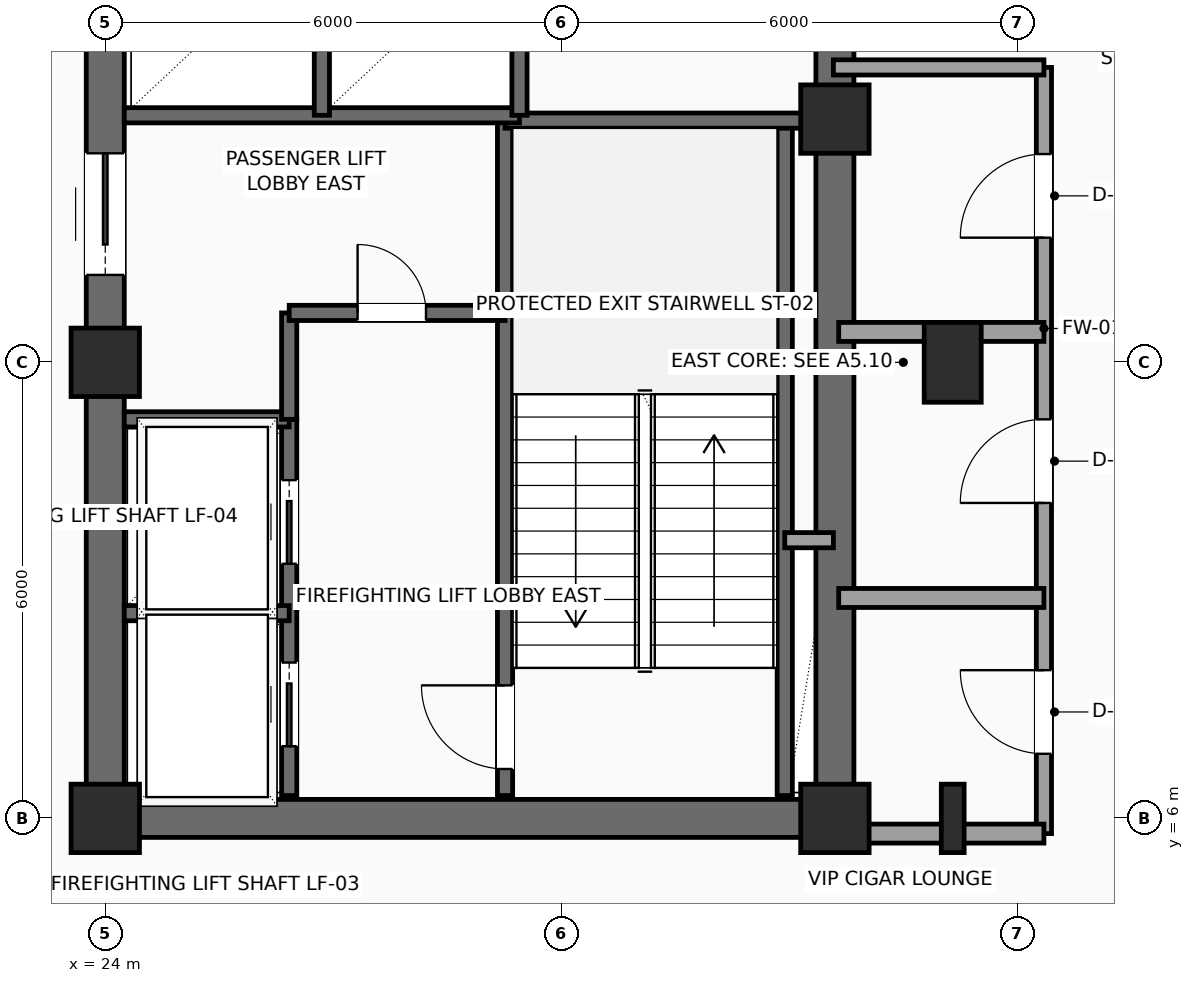
"""IFC4 building model, lengths in metres.
Left out: names, types, materials, properties, quantities, classifications, styles, units other than length and angle.
Written with IfcOpenShell. Run it as: python <this file> out.ifc"""

import sys

from ifc_helpers import new_model, si_unit, direction, frame, frame_2d, origin, origin_2d, place, context, subcontext, project, spatial, rectangle, i_section, extrude, element, fill, save


model = new_model("IFC4")
c1 = context("Model", 3, precision=1e-05, world=origin(), true_north=direction((0.0, 1.0)))
c2 = subcontext(c1, "Body", "Model", "MODEL_VIEW")
j1 = project(units=[si_unit("LENGTHUNIT", "METRE"), si_unit("PLANEANGLEUNIT", "RADIAN")], contexts=[c1])
p1 = place(None, origin())
s1 = spatial("IfcSite", under=j1, at=p1, CompositionType="ELEMENT")
p2 = place(p1, origin())
s2 = spatial("IfcBuilding", under=s1, at=p2, CompositionType="ELEMENT")
p3 = place(p2, frame((0.0, 0.0, 180.45)))
s3 = spatial("IfcBuildingStorey", under=s2, at=p3, CompositionType="ELEMENT", Elevation=180.45)
for number, where, z_axis, x_axis in (
    (1, (24.0, 6.0, 0.0), (0.0, 0.0, 1.0), (1.0, 0.0, 0.0)),
    (2, (24.0, 12.0, 0.0), (0.0, 0.0, 1.0), (1.0, 0.0, 0.0)),
    (3, (33.6, 6.0, 0.0), (0.0, 0.0, 1.0), (1.0, 0.0, 0.0)),
    (4, (33.6, 15.2, 0.0), (0.0, 0.0, 1.0), (1.0, 0.0, 0.0)),
):
    element("IfcColumn", number, at=place(p3, frame(where, z_axis=z_axis, x_axis=x_axis)), inside=s3, PredefinedType="COLUMN", context=c2, shape_type="SweptSolid", body=[
        extrude(rectangle(XDim=0.9, YDim=0.9, at=origin_2d()), origin(), (0.0, 0.0, 1.0), 3.75),
    ])
p4 = place(p3, frame((35.15, 6.0, 0.0), z_axis=(0.0, 0.0, 1.0), x_axis=(1.0, 0.0, 0.0)))
e5 = element("IfcColumn", 5, at=p4, inside=s3, PredefinedType="COLUMN", context=c2, shape_type="SweptSolid", body=[
    extrude(i_section(OverallWidth=0.3, OverallDepth=0.9, WebThickness=0.019, FlangeThickness=0.035, FilletRadius=0.03, at=origin_2d()), origin(), (0.0, 0.0, 1.0), 3.75),
])
p5 = place(p3, frame((35.15, 12.0, 0.0), z_axis=(0.0, 0.0, 1.0), x_axis=(1.0, 0.0, 0.0)))
e6 = element("IfcColumn", 6, at=p5, inside=s3, PredefinedType="COLUMN", context=c2, shape_type="SweptSolid", body=[
    extrude(rectangle(XDim=0.75, YDim=1.05, at=origin_2d()), origin(), (0.0, 0.0, 1.0), 3.75),
])
p6 = place(p3, frame((24.0, 6.0, 0.0), z_axis=(0.0, 0.0, 1.0), x_axis=(1.0, 0.0, 0.0)))
e7 = element("IfcWall", 7, at=p6, inside=s3, PredefinedType="SHEAR", context=c2, shape_type="SweptSolid", body=[
    extrude(rectangle(XDim=9.6, YDim=0.5, at=frame_2d((4.8, 0.0))), origin(), (0.0, 0.0, 1.0), 3.54),
])
p7 = place(p3, frame((24.0, 6.0, 0.0), z_axis=(0.0, 0.0, 1.0), x_axis=(0.0, 1.0, 0.0)))
e8 = element("IfcWall", 8, at=p7, inside=s3, PredefinedType="SHEAR", context=c2, shape_type="SweptSolid", body=[
    extrude(rectangle(XDim=12.0, YDim=0.5, at=frame_2d((6.0, 0.0))), origin(), (0.0, 0.0, 1.0), 3.54),
])
p8 = place(p7, frame((7.15, 0.0, 0.0)))
e9 = element("IfcOpeningElement", 9, at=p8, cuts=e8, PredefinedType="OPENING", context=c2, shape_type="SweptSolid", body=[
    extrude(rectangle(XDim=1.6, YDim=2.3, at=frame_2d((0.8, 1.15))), frame((0.0, 0.26, 0.0), z_axis=(0.0, -1.0, 0.0), x_axis=(1.0, 0.0, 0.0)), (0.0, 0.0, 1.0), 0.52),
])
p9 = place(p3, frame((33.6, 6.0, 0.0), z_axis=(0.0, 0.0, 1.0), x_axis=(0.0, 1.0, 0.0)))
e10 = element("IfcWall", 10, at=p9, inside=s3, PredefinedType="SHEAR", context=c2, shape_type="SweptSolid", body=[
    extrude(rectangle(XDim=12.0, YDim=0.5, at=frame_2d((6.0, 0.0))), origin(), (0.0, 0.0, 1.0), 3.54),
])
p10 = place(p9, frame((10.15, 0.0, 0.0)))
e11 = element("IfcOpeningElement", 11, at=p10, cuts=e10, PredefinedType="OPENING", context=c2, shape_type="SweptSolid", body=[
    extrude(rectangle(XDim=0.9, YDim=2.15, at=frame_2d((0.45, 1.075))), frame((0.0, 0.26, 0.0), z_axis=(0.0, -1.0, 0.0), x_axis=(1.0, 0.0, 0.0)), (0.0, 0.0, 1.0), 0.52),
])
p11 = place(p3, frame((29.26, 6.3, 0.0), z_axis=(0.0, 0.0, 1.0), x_axis=(0.0, 1.0, 0.0)))
e12 = element("IfcWall", 12, at=p11, inside=s3, PredefinedType="SHEAR", context=c2, shape_type="SweptSolid", body=[
    extrude(rectangle(XDim=8.88, YDim=0.2, at=frame_2d((4.44, 0.0))), origin(), (0.0, 0.0, 1.0), 3.54),
])
p12 = place(p11, frame((0.35, 0.0, 0.0)))
e13 = element("IfcOpeningElement", 13, at=p12, cuts=e12, PredefinedType="OPENING", context=c2, shape_type="SweptSolid", body=[
    extrude(rectangle(XDim=1.1, YDim=2.2, at=frame_2d((0.55, 1.1))), frame((0.0, 0.11, 0.0), z_axis=(0.0, -1.0, 0.0), x_axis=(1.0, 0.0, 0.0)), (0.0, 0.0, 1.0), 0.22),
])
p13 = place(p3, frame((32.94, 6.3, 0.0), z_axis=(0.0, 0.0, 1.0), x_axis=(0.0, 1.0, 0.0)))
e14 = element("IfcWall", 14, at=p13, inside=s3, PredefinedType="SHEAR", context=c2, shape_type="SweptSolid", body=[
    extrude(rectangle(XDim=8.88, YDim=0.2, at=frame_2d((4.44, 0.0))), origin(), (0.0, 0.0, 1.0), 3.54),
])
p14 = place(p3, frame((29.26, 15.18, 0.0), z_axis=(0.0, 0.0, 1.0), x_axis=(1.0, 0.0, 0.0)))
e15 = element("IfcWall", 15, at=p14, inside=s3, PredefinedType="SHEAR", context=c2, shape_type="SweptSolid", body=[
    extrude(rectangle(XDim=4.04, YDim=0.2, at=frame_2d((2.02, 0.0))), origin(), (0.0, 0.0, 1.0), 3.54),
])
p15 = place(p3, frame((26.42, 6.3, 0.0), z_axis=(0.0, 0.0, 1.0), x_axis=(0.0, 1.0, 0.0)))
e16 = element("IfcWall", 16, at=p15, inside=s3, PredefinedType="SHEAR", context=c2, shape_type="SweptSolid", body=[
    extrude(rectangle(XDim=4.95, YDim=0.2, at=frame_2d((2.475, 0.0))), origin(), (0.0, 0.0, 1.0), 3.54),
])
p16 = place(p15, frame((0.65, 0.0, 0.0)))
e17 = element("IfcOpeningElement", 17, at=p16, cuts=e16, PredefinedType="OPENING", context=c2, shape_type="SweptSolid", body=[
    extrude(rectangle(XDim=1.1, YDim=2.2, at=frame_2d((0.55, 1.1))), frame((0.0, 0.11, 0.0), z_axis=(0.0, -1.0, 0.0), x_axis=(1.0, 0.0, 0.0)), (0.0, 0.0, 1.0), 0.22),
])
p17 = place(p15, frame((3.05, 0.0, 0.0)))
e18 = element("IfcOpeningElement", 18, at=p17, cuts=e16, PredefinedType="OPENING", context=c2, shape_type="SweptSolid", body=[
    extrude(rectangle(XDim=1.1, YDim=2.2, at=frame_2d((0.55, 1.1))), frame((0.0, 0.11, 0.0), z_axis=(0.0, -1.0, 0.0), x_axis=(1.0, 0.0, 0.0)), (0.0, 0.0, 1.0), 0.22),
])
for number, where, z_axis, x_axis in (
    (19, (24.25, 8.7, 0.0), (0.0, 0.0, 1.0), (1.0, 0.0, 0.0)),
    (20, (24.25, 11.25, 0.0), (0.0, 0.0, 1.0), (1.0, 0.0, 0.0)),
):
    element("IfcWall", number, at=place(p3, frame(where, z_axis=z_axis, x_axis=x_axis)), inside=s3, PredefinedType="SHEAR", context=c2, shape_type="SweptSolid", body=[
        extrude(rectangle(XDim=2.17, YDim=0.2, at=frame_2d((1.085, 0.0))), origin(), (0.0, 0.0, 1.0), 3.54),
    ])
p18 = place(p3, frame((26.42, 11.25, 0.0), z_axis=(0.0, 0.0, 1.0), x_axis=(0.0, 1.0, 0.0)))
e21 = element("IfcWall", 21, at=p18, inside=s3, PredefinedType="SHEAR", context=c2, shape_type="SweptSolid", body=[
    extrude(rectangle(XDim=1.4, YDim=0.2, at=frame_2d((0.7, 0.0))), origin(), (0.0, 0.0, 1.0), 3.54),
])
p19 = place(p3, frame((26.42, 12.65, 0.0), z_axis=(0.0, 0.0, 1.0), x_axis=(1.0, 0.0, 0.0)))
e22 = element("IfcWall", 22, at=p19, inside=s3, PredefinedType="SHEAR", context=c2, shape_type="SweptSolid", body=[
    extrude(rectangle(XDim=2.84, YDim=0.2, at=frame_2d((1.42, 0.0))), origin(), (0.0, 0.0, 1.0), 3.54),
])
p20 = place(p19, frame((0.9, 0.0, 0.0)))
e23 = element("IfcOpeningElement", 23, at=p20, cuts=e22, PredefinedType="OPENING", context=c2, shape_type="SweptSolid", body=[
    extrude(rectangle(XDim=0.9, YDim=2.15, at=frame_2d((0.45, 1.075))), frame((0.0, 0.11, 0.0), z_axis=(0.0, -1.0, 0.0), x_axis=(1.0, 0.0, 0.0)), (0.0, 0.0, 1.0), 0.22),
])
p21 = place(p3, frame((32.94, 9.66, 0.0), z_axis=(0.0, 0.0, 1.0), x_axis=(1.0, 0.0, 0.0)))
e24 = element("IfcWall", 24, at=p21, inside=s3, PredefinedType="SOLIDWALL", context=c2, shape_type="SweptSolid", body=[
    extrude(rectangle(XDim=0.64, YDim=0.2, at=frame_2d((0.32, 0.0))), origin(), (0.0, 0.0, 1.0), 3.54),
])
p22 = place(p3, frame((24.25, 15.25, 0.0), z_axis=(0.0, 0.0, 1.0), x_axis=(1.0, 0.0, 0.0)))
e25 = element("IfcWall", 25, at=p22, inside=s3, PredefinedType="SHEAR", context=c2, shape_type="SweptSolid", body=[
    extrude(rectangle(XDim=5.2, YDim=0.2, at=frame_2d((2.6, 0.0))), origin(), (0.0, 0.0, 1.0), 3.54),
])
p23 = place(p3, frame((26.85, 15.25, 0.0), z_axis=(0.0, 0.0, 1.0), x_axis=(0.0, 1.0, 0.0)))
e26 = element("IfcWall", 26, at=p23, inside=s3, PredefinedType="SHEAR", context=c2, shape_type="SweptSolid", body=[
    extrude(rectangle(XDim=2.4, YDim=0.2, at=frame_2d((1.2, 0.0))), origin(), (0.0, 0.0, 1.0), 3.54),
])
p24 = place(p3, frame((29.45, 15.25, 0.0), z_axis=(0.0, 0.0, 1.0), x_axis=(0.0, 1.0, 0.0)))
e27 = element("IfcWall", 27, at=p24, inside=s3, PredefinedType="SHEAR", context=c2, shape_type="SweptSolid", body=[
    extrude(rectangle(XDim=2.45, YDim=0.2, at=frame_2d((1.225, 0.0))), origin(), (0.0, 0.0, 1.0), 3.54),
])
p25 = place(p3, frame((36.35, 5.8, 0.0), z_axis=(0.0, 0.0, 1.0), x_axis=(0.0, 1.0, 0.0)))
e28 = element("IfcWall", 28, at=p25, inside=s3, PredefinedType="SOLIDWALL", context=c2, shape_type="SweptSolid", body=[
    extrude(rectangle(XDim=10.08, YDim=0.2, at=frame_2d((5.04, 0.0))), origin(), (0.0, 0.0, 1.0), 3.54),
])
p26 = place(p25, frame((1.05, 0.0, 0.0)))
e29 = element("IfcOpeningElement", 29, at=p26, cuts=e28, PredefinedType="OPENING", context=c2, shape_type="SweptSolid", body=[
    extrude(rectangle(XDim=1.1, YDim=2.25, at=frame_2d((0.55, 1.125))), frame((0.0, 0.11, 0.0), z_axis=(0.0, -1.0, 0.0), x_axis=(1.0, 0.0, 0.0)), (0.0, 0.0, 1.0), 0.22),
])
p27 = place(p25, frame((4.35, 0.0, 0.0)))
e30 = element("IfcOpeningElement", 30, at=p27, cuts=e28, PredefinedType="OPENING", context=c2, shape_type="SweptSolid", body=[
    extrude(rectangle(XDim=1.1, YDim=2.25, at=frame_2d((0.55, 1.125))), frame((0.0, 0.11, 0.0), z_axis=(0.0, -1.0, 0.0), x_axis=(1.0, 0.0, 0.0)), (0.0, 0.0, 1.0), 0.22),
])
p28 = place(p25, frame((7.84, 0.0, 0.0)))
e31 = element("IfcOpeningElement", 31, at=p28, cuts=e28, PredefinedType="OPENING", context=c2, shape_type="SweptSolid", body=[
    extrude(rectangle(XDim=1.1, YDim=2.25, at=frame_2d((0.55, 1.125))), frame((0.0, 0.11, 0.0), z_axis=(0.0, -1.0, 0.0), x_axis=(1.0, 0.0, 0.0)), (0.0, 0.0, 1.0), 0.22),
])
p29 = place(p3, frame((36.35, 15.88, 0.0), z_axis=(0.0, 0.0, 1.0), x_axis=(-1.0, 0.0, 0.0)))
e32 = element("IfcWall", 32, at=p29, inside=s3, PredefinedType="SOLIDWALL", context=c2, shape_type="SweptSolid", body=[
    extrude(rectangle(XDim=2.77, YDim=0.2, at=frame_2d((1.385, 0.0))), origin(), (0.0, 0.0, 1.0), 3.54),
])
for number, where, z_axis, x_axis in (
    (33, (33.65, 5.8, 0.0), (0.0, 0.0, 1.0), (1.0, 0.0, 0.0)),
    (34, (33.65, 8.9, 0.0), (0.0, 0.0, 1.0), (1.0, 0.0, 0.0)),
):
    element("IfcWall", number, at=place(p3, frame(where, z_axis=z_axis, x_axis=x_axis)), inside=s3, PredefinedType="PARTITIONING", context=c2, shape_type="SweptSolid", body=[
        extrude(rectangle(XDim=2.7, YDim=0.25, at=frame_2d((1.35, 0.0))), origin(), (0.0, 0.0, 1.0), 3.132),
    ])
p30 = place(p3, frame((33.65, 12.4, 0.0), z_axis=(0.0, 0.0, 1.0), x_axis=(1.0, 0.0, 0.0)))
e35 = element("IfcWall", 35, at=p30, inside=s3, PredefinedType="PARTITIONING", context=c2, shape_type="SweptSolid", body=[
    extrude(rectangle(XDim=2.7, YDim=0.25, at=frame_2d((1.35, 0.0))), origin(), (0.0, 0.0, 1.0), 3.54),
])
p31 = place(p8, origin())
e36 = element("IfcDoor", 36, at=p31, inside=s3, OperationType="DOUBLE_DOOR_SLIDING", PredefinedType="DOOR", context=c2, shape_type="SweptSolid", body=[
    extrude(rectangle(XDim=1.6, YDim=2.3, at=frame_2d((0.8, 1.15))), frame((0.0, 0.025, 0.0), z_axis=(0.0, -1.0, 0.0), x_axis=(1.0, 0.0, 0.0)), (0.0, 0.0, 1.0), 0.05),
])
fill(e9, e36)
p32 = place(p12, origin())
e37 = element("IfcDoor", 37, at=p32, inside=s3, OperationType="SINGLE_SWING_RIGHT", PredefinedType="DOOR", context=c2, shape_type="SweptSolid", body=[
    extrude(rectangle(XDim=1.1, YDim=2.2, at=frame_2d((0.55, 1.1))), frame((0.0, 0.025, 0.0), z_axis=(0.0, -1.0, 0.0), x_axis=(1.0, 0.0, 0.0)), (0.0, 0.0, 1.0), 0.05),
])
fill(e13, e37)
p33 = place(p16, origin())
e38 = element("IfcDoor", 38, at=p33, inside=s3, OperationType="SLIDING_TO_LEFT", PredefinedType="DOOR", context=c2, shape_type="SweptSolid", body=[
    extrude(rectangle(XDim=1.1, YDim=2.2, at=frame_2d((0.55, 1.1))), frame((0.0, 0.025, 0.0), z_axis=(0.0, -1.0, 0.0), x_axis=(1.0, 0.0, 0.0)), (0.0, 0.0, 1.0), 0.05),
])
fill(e17, e38)
p34 = place(p17, origin())
e39 = element("IfcDoor", 39, at=p34, inside=s3, OperationType="SLIDING_TO_LEFT", PredefinedType="DOOR", context=c2, shape_type="SweptSolid", body=[
    extrude(rectangle(XDim=1.1, YDim=2.2, at=frame_2d((0.55, 1.1))), frame((0.0, 0.025, 0.0), z_axis=(0.0, -1.0, 0.0), x_axis=(1.0, 0.0, 0.0)), (0.0, 0.0, 1.0), 0.05),
])
fill(e18, e39)
p35 = place(p20, origin())
e40 = element("IfcDoor", 40, at=p35, inside=s3, OperationType="SINGLE_SWING_LEFT", PredefinedType="DOOR", context=c2, shape_type="SweptSolid", body=[
    extrude(rectangle(XDim=0.9, YDim=2.15, at=frame_2d((0.45, 1.075))), frame((0.0, 0.025, 0.0), z_axis=(0.0, -1.0, 0.0), x_axis=(1.0, 0.0, 0.0)), (0.0, 0.0, 1.0), 0.05),
])
fill(e23, e40)
p36 = place(p26, origin())
e41 = element("IfcDoor", 41, at=p36, inside=s3, OperationType="SINGLE_SWING_RIGHT", PredefinedType="DOOR", context=c2, shape_type="SweptSolid", body=[
    extrude(rectangle(XDim=1.1, YDim=2.25, at=frame_2d((0.55, 1.125))), frame((0.0, 0.025, 0.0), z_axis=(0.0, -1.0, 0.0), x_axis=(1.0, 0.0, 0.0)), (0.0, 0.0, 1.0), 0.05),
])
fill(e29, e41)
p37 = place(p27, origin())
e42 = element("IfcDoor", 42, at=p37, inside=s3, OperationType="SINGLE_SWING_LEFT", PredefinedType="DOOR", context=c2, shape_type="SweptSolid", body=[
    extrude(rectangle(XDim=1.1, YDim=2.25, at=frame_2d((0.55, 1.125))), frame((0.0, 0.025, 0.0), z_axis=(0.0, -1.0, 0.0), x_axis=(1.0, 0.0, 0.0)), (0.0, 0.0, 1.0), 0.05),
])
fill(e30, e42)
p38 = place(p28, origin())
e43 = element("IfcDoor", 43, at=p38, inside=s3, OperationType="SINGLE_SWING_LEFT", PredefinedType="DOOR", context=c2, shape_type="SweptSolid", body=[
    extrude(rectangle(XDim=1.1, YDim=2.25, at=frame_2d((0.55, 1.125))), frame((0.0, 0.025, 0.0), z_axis=(0.0, -1.0, 0.0), x_axis=(1.0, 0.0, 0.0)), (0.0, 0.0, 1.0), 0.05),
])
fill(e31, e43)
save(model, sys.argv[1])
